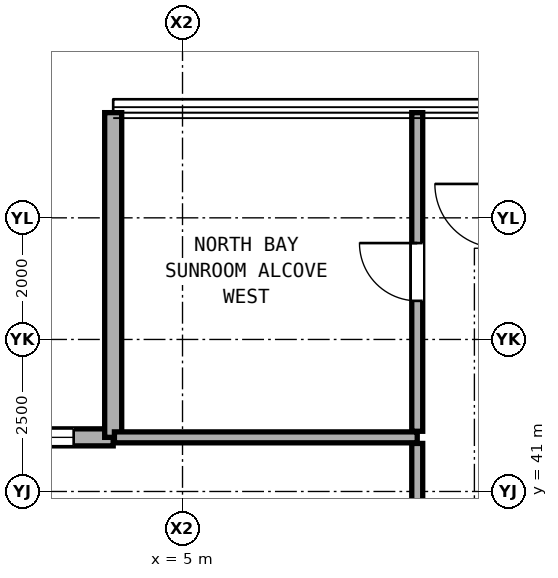
"""IFC4 building model, lengths in metres.
Left out: names, types, materials, properties, quantities, classifications, styles, units other than length and angle.
Written with IfcOpenShell. Run it as: python <this file> out.ifc"""

import sys

from ifc_helpers import new_model, si_unit, direction, frame, frame_2d, origin, place, context, subcontext, project, spatial, rectangle, extrude, element, fill, save


model = new_model("IFC4")
c1 = context("Model", 3, precision=1e-05, world=origin(), true_north=direction((0.0, 1.0)))
c2 = subcontext(c1, "Body", "Model", "MODEL_VIEW")
j1 = project(units=[si_unit("LENGTHUNIT", "METRE"), si_unit("PLANEANGLEUNIT", "RADIAN")], contexts=[c1])
p1 = place(None, origin())
s1 = spatial("IfcSite", under=j1, at=p1, CompositionType="ELEMENT")
p2 = place(p1, origin())
s2 = spatial("IfcBuilding", under=s1, at=p2, CompositionType="ELEMENT")
p3 = place(p2, frame((0.0, 0.0, 68.6)))
s3 = spatial("IfcBuildingStorey", under=s2, at=p3, CompositionType="ELEMENT", Elevation=68.6)
p4 = place(p3, frame((3.86, 41.89, 0.0), z_axis=(0.0, 0.0, 1.0), x_axis=(-1.0, 0.0, 0.0)))
e1 = element("IfcWall", 1, at=p4, inside=s3, PredefinedType="SOLIDWALL", context=c2, shape_type="SweptSolid", body=[
    extrude(rectangle(XDim=5.34, YDim=0.28, at=frame_2d((2.67, 0.0))), origin(), (0.0, 0.0, 1.0), 3.04),
])
p5 = place(p4, frame((0.65, 0.0, 0.85)))
e2 = element("IfcOpeningElement", 2, at=p5, cuts=e1, PredefinedType="OPENING", context=c2, shape_type="SweptSolid", body=[
    extrude(rectangle(XDim=1.1, YDim=2.0, at=frame_2d((0.55, 1.0))), frame((0.0, 0.15, 0.0), z_axis=(0.0, -1.0, 0.0), x_axis=(1.0, 0.0, 0.0)), (0.0, 0.0, 1.0), 0.3),
])
p6 = place(p3, frame((3.86, 47.23, 0.0), z_axis=(0.0, 0.0, 1.0), x_axis=(0.0, -1.0, 0.0)))
e3 = element("IfcWall", 3, at=p6, inside=s3, PredefinedType="SOLIDWALL", context=c2, shape_type="SweptSolid", body=[
    extrude(rectangle(XDim=5.34, YDim=0.28, at=frame_2d((2.67, 0.0))), origin(), (0.0, 0.0, 1.0), 3.04),
])
p7 = place(p3, frame((3.88, 41.89, 0.0), z_axis=(0.0, 0.0, 1.0), x_axis=(1.0, 0.0, 0.0)))
e4 = element("IfcWall", 4, at=p7, inside=s3, PredefinedType="PARTITIONING", context=c2, shape_type="SweptSolid", body=[
    extrude(rectangle(XDim=4.98, YDim=0.18, at=frame_2d((2.49, 0.0))), origin(), (0.0, 0.0, 1.0), 3.06),
])
p8 = place(p3, frame((8.86, 27.2, 0.0), z_axis=(0.0, 0.0, 1.0), x_axis=(0.0, 1.0, 0.0)))
e5 = element("IfcWall", 5, at=p8, inside=s3, PredefinedType="PARTITIONING", context=c2, shape_type="SweptSolid", body=[
    extrude(rectangle(XDim=14.59, YDim=0.18, at=frame_2d((7.295, 0.0))), origin(), (0.0, 0.0, 1.0), 2.279),
])
p9 = place(p8, frame((6.77, 0.0, 0.0)))
e6 = element("IfcOpeningElement", 6, at=p9, cuts=e5, PredefinedType="OPENING", context=c2, shape_type="SweptSolid", body=[
    extrude(rectangle(XDim=1.05, YDim=2.2, at=frame_2d((0.525, 1.1))), frame((0.0, 0.1, 0.0), z_axis=(0.0, -1.0, 0.0), x_axis=(1.0, 0.0, 0.0)), (0.0, 0.0, 1.0), 0.2),
])
p10 = place(p3, frame((8.86, 41.99, 0.0), z_axis=(0.0, 0.0, 1.0), x_axis=(0.0, 1.0, 0.0)))
e7 = element("IfcWall", 7, at=p10, inside=s3, PredefinedType="PARTITIONING", context=c2, shape_type="SweptSolid", body=[
    extrude(rectangle(XDim=5.24, YDim=0.18, at=frame_2d((2.62, 0.0))), origin(), (0.0, 0.0, 1.0), 3.06),
])
p11 = place(p10, frame((2.145, 0.0, 0.0)))
e8 = element("IfcOpeningElement", 8, at=p11, cuts=e7, PredefinedType="OPENING", context=c2, shape_type="SweptSolid", body=[
    extrude(rectangle(XDim=0.95, YDim=2.15, at=frame_2d((0.475, 1.075))), frame((0.0, 0.1, 0.0), z_axis=(0.0, -1.0, 0.0), x_axis=(1.0, 0.0, 0.0)), (0.0, 0.0, 1.0), 0.2),
])
p12 = place(p5, origin())
e9 = element("IfcWindow", 9, at=p12, inside=s3, PartitioningType="SINGLE_PANEL", PredefinedType="WINDOW", context=c2, shape_type="SweptSolid", body=[
    extrude(rectangle(XDim=1.1, YDim=2.0, at=frame_2d((0.55, 1.0))), frame((0.0, 0.03, 0.0), z_axis=(0.0, -1.0, 0.0), x_axis=(1.0, 0.0, 0.0)), (0.0, 0.0, 1.0), 0.06),
])
fill(e2, e9)
p13 = place(p11, origin())
e10 = element("IfcDoor", 10, at=p13, inside=s3, OperationType="SINGLE_SWING_RIGHT", PredefinedType="DOOR", context=c2, shape_type="SweptSolid", body=[
    extrude(rectangle(XDim=0.95, YDim=2.15, at=frame_2d((0.475, 1.075))), frame((0.0, 0.025, 0.0), z_axis=(0.0, -1.0, 0.0), x_axis=(1.0, 0.0, 0.0)), (0.0, 0.0, 1.0), 0.05),
])
fill(e8, e10)
save(model, sys.argv[1])
